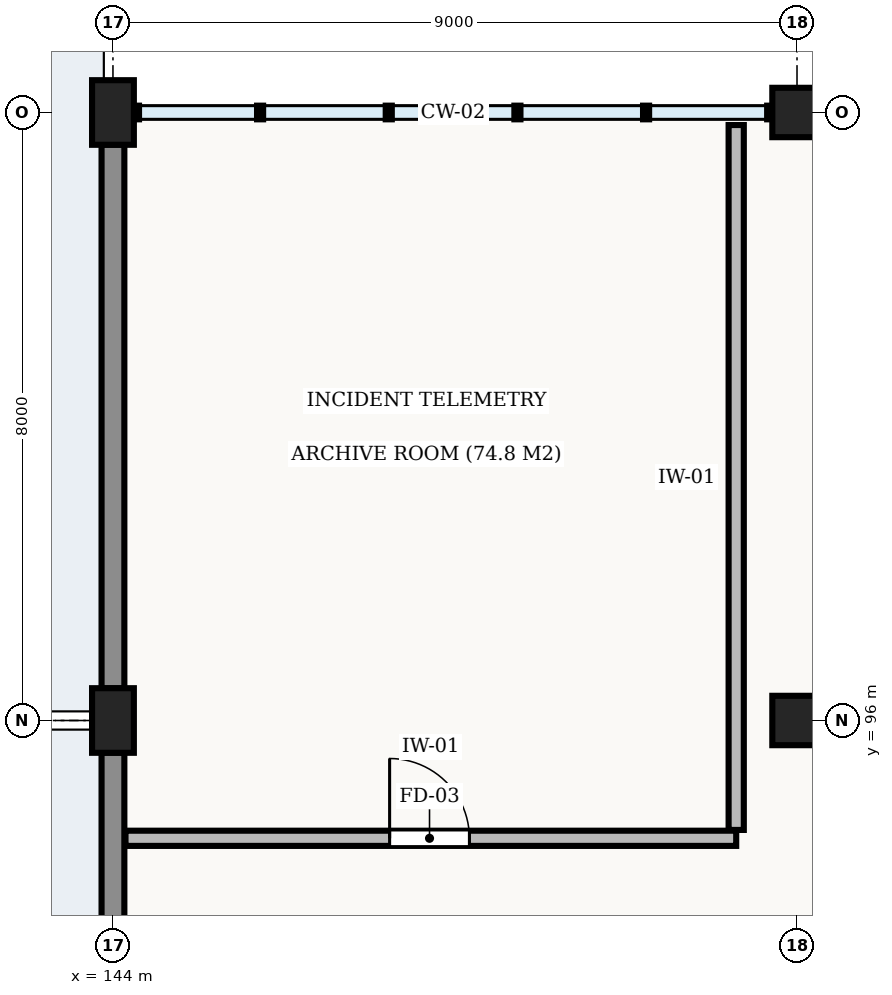
"""IFC4 building model, lengths in metres.
Left out: names, types, materials, properties, quantities, classifications, styles, units other than length and angle.
Written with IfcOpenShell. Run it as: python <this file> out.ifc"""

import sys

from ifc_helpers import new_model, si_unit, direction, frame, frame_2d, origin, origin_2d, place, context, subcontext, project, spatial, rectangle, extrude, element, fill, save


model = new_model("IFC4")
c1 = context("Model", 3, precision=1e-05, world=origin(), true_north=direction((0.0, 1.0)))
c2 = subcontext(c1, "Body", "Model", "MODEL_VIEW")
j1 = project(units=[si_unit("LENGTHUNIT", "METRE"), si_unit("PLANEANGLEUNIT", "RADIAN")], contexts=[c1])
p1 = place(None, origin())
s1 = spatial("IfcSite", under=j1, at=p1, CompositionType="ELEMENT")
p2 = place(p1, origin())
s2 = spatial("IfcBuilding", under=s1, at=p2, CompositionType="ELEMENT")
p3 = place(p2, frame((0.0, 0.0, 18.6)))
s3 = spatial("IfcBuildingStorey", under=s2, at=p3, CompositionType="ELEMENT", Elevation=18.6)
for number, where, z_axis, x_axis in (
    (1, (144.0, 96.0, 0.0), (0.0, 0.0, 1.0), (1.0, 0.0, 0.0)),
    (2, (144.0, 104.0, 0.0), (0.0, 0.0, 1.0), (1.0, 0.0, 0.0)),
):
    element("IfcColumn", number, at=place(p3, frame(where, z_axis=z_axis, x_axis=x_axis)), inside=s3, PredefinedType="COLUMN", context=c2, shape_type="SweptSolid", body=[
        extrude(rectangle(XDim=0.55, YDim=0.85, at=origin_2d()), origin(), (0.0, 0.0, 1.0), 4.2),
    ])
for number, where, z_axis, x_axis in (
    (3, (153.0, 96.0, 0.0), (0.0, 0.0, 1.0), (1.0, 0.0, 0.0)),
    (4, (153.0, 104.0, 0.0), (0.0, 0.0, 1.0), (1.0, 0.0, 0.0)),
):
    element("IfcColumn", number, at=place(p3, frame(where, z_axis=z_axis, x_axis=x_axis)), inside=s3, PredefinedType="COLUMN", context=c2, shape_type="SweptSolid", body=[
        extrude(rectangle(XDim=0.65, YDim=0.65, at=origin_2d()), origin(), (0.0, 0.0, 1.0), 4.2),
    ])
p4 = place(p3, frame((144.0, 88.423, 0.0), z_axis=(0.0, 0.0, 1.0), x_axis=(0.0, 1.0, 0.0)))
e5 = element("IfcWall", 5, at=p4, inside=s3, PredefinedType="STANDARD", context=c2, shape_type="SweptSolid", body=[
    extrude(rectangle(XDim=7.154, YDim=0.3, at=frame_2d((3.577, 0.0))), origin(), (0.0, 0.0, 1.0), 3.44),
])
p5 = place(p3, frame((144.0, 96.423, 0.0), z_axis=(0.0, 0.0, 1.0), x_axis=(0.0, 1.0, 0.0)))
e6 = element("IfcWall", 6, at=p5, inside=s3, PredefinedType="STANDARD", context=c2, shape_type="SweptSolid", body=[
    extrude(rectangle(XDim=7.154, YDim=0.3, at=frame_2d((3.577, 0.0))), origin(), (0.0, 0.0, 1.0), 3.39),
])
p6 = place(p3, frame((144.165, 94.45, 0.0), z_axis=(0.0, 0.0, 1.0), x_axis=(1.0, 0.0, 0.0)))
e7 = element("IfcWall", 7, at=p6, inside=s3, PredefinedType="STANDARD", context=c2, shape_type="SweptSolid", body=[
    extrude(rectangle(XDim=8.035, YDim=0.2, at=frame_2d((4.018, 0.0))), origin(), (0.0, 0.0, 1.0), 3.91),
])
p7 = place(p6, frame((3.475, 0.0, 0.0)))
e8 = element("IfcOpeningElement", 8, at=p7, cuts=e7, PredefinedType="OPENING", context=c2, shape_type="SweptSolid", body=[
    extrude(rectangle(XDim=1.05, YDim=2.15, at=frame_2d((0.525, 1.075))), frame((0.0, 0.112, 0.0), z_axis=(0.0, -1.0, 0.0), x_axis=(1.0, 0.0, 0.0)), (0.0, 0.0, 1.0), 0.224),
])
p8 = place(p3, frame((152.2, 94.56, 0.0), z_axis=(0.0, 0.0, 1.0), x_axis=(0.0, 1.0, 0.0)))
e9 = element("IfcWall", 9, at=p8, inside=s3, PredefinedType="STANDARD", context=c2, shape_type="SweptSolid", body=[
    extrude(rectangle(XDim=9.275, YDim=0.2, at=frame_2d((4.637, 0.0))), origin(), (0.0, 0.0, 1.0), 3.91),
])
p9 = place(p7, origin())
e10 = element("IfcDoor", 10, at=p9, inside=s3, OperationType="SINGLE_SWING_LEFT", PredefinedType="DOOR", context=c2, shape_type="SweptSolid", body=[
    extrude(rectangle(XDim=1.05, YDim=2.15, at=frame_2d((0.525, 1.075))), frame((0.0, 0.025, 0.0), z_axis=(0.0, -1.0, 0.0), x_axis=(1.0, 0.0, 0.0)), (0.0, 0.0, 1.0), 0.05),
])
fill(e8, e10)
save(model, sys.argv[1])
